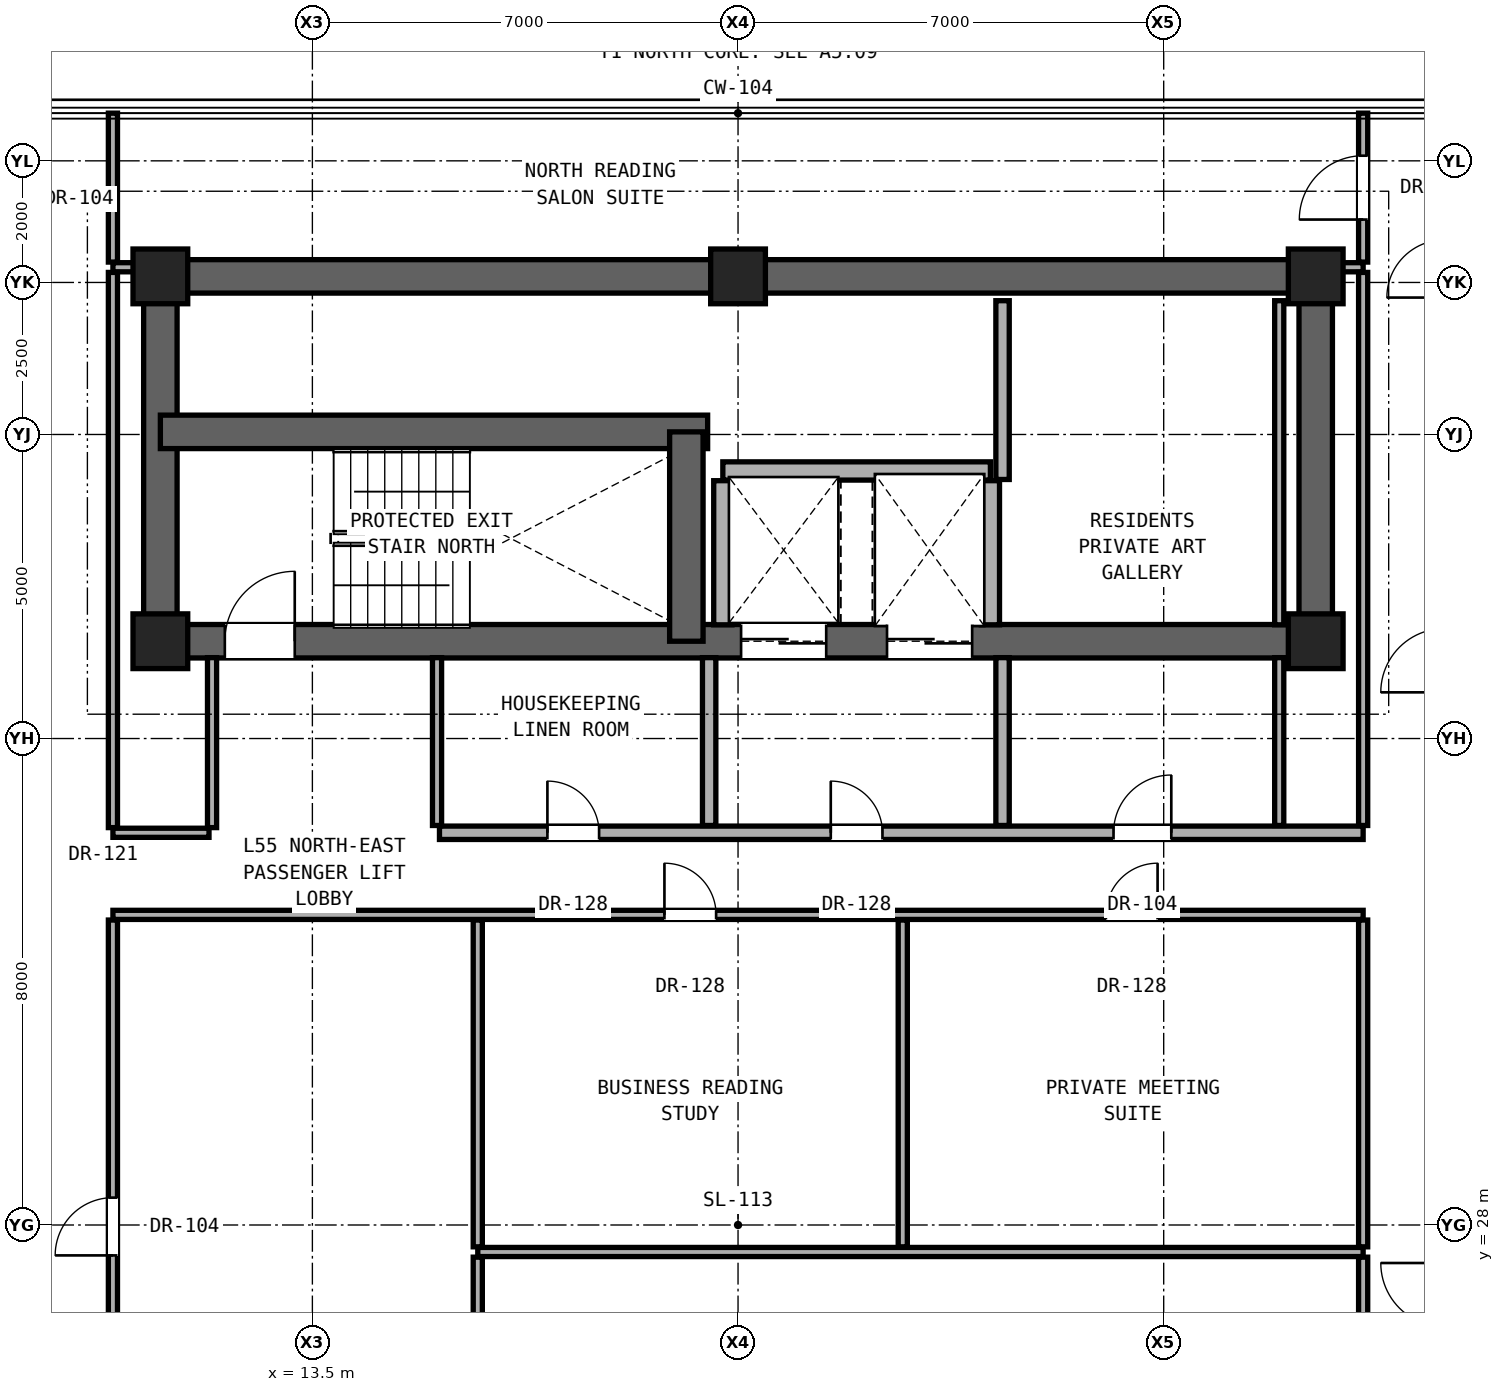
"""IFC4 building model, lengths in metres.
Left out: names, types, materials, properties, quantities, classifications, styles, units other than length and angle.
Written with IfcOpenShell. Run it as: python <this file> out.ifc"""

import sys

from ifc_helpers import new_model, si_unit, direction, frame, frame_2d, origin, origin_2d, place, context, subcontext, project, spatial, rectangle, extrude, element, fill, save


model = new_model("IFC4")
c1 = context("Model", 3, precision=1e-05, world=origin(), true_north=direction((0.0, 1.0)))
c2 = subcontext(c1, "Body", "Model", "MODEL_VIEW")
j1 = project(units=[si_unit("LENGTHUNIT", "METRE"), si_unit("PLANEANGLEUNIT", "RADIAN")], contexts=[c1])
p1 = place(None, origin())
s1 = spatial("IfcSite", under=j1, at=p1, CompositionType="ELEMENT")
p2 = place(p1, origin())
s2 = spatial("IfcBuilding", under=s1, at=p2, CompositionType="ELEMENT")
p3 = place(p2, frame((0.0, 0.0, 193.4)))
s3 = spatial("IfcBuildingStorey", under=s2, at=p3, CompositionType="ELEMENT", Elevation=193.4)
for number, where, z_axis, x_axis in (
    (1, (11.0, 37.6, 0.0), (0.0, 0.0, 1.0), (1.0, 0.0, 0.0)),
    (2, (30.0, 37.6, 0.0), (0.0, 0.0, 1.0), (1.0, 0.0, 0.0)),
    (3, (11.0, 43.6, 0.0), (0.0, 0.0, 1.0), (1.0, 0.0, 0.0)),
    (4, (20.5, 43.6, 0.0), (0.0, 0.0, 1.0), (1.0, 0.0, 0.0)),
    (5, (30.0, 43.6, 0.0), (0.0, 0.0, 1.0), (1.0, 0.0, 0.0)),
):
    element("IfcColumn", number, at=place(p3, frame(where, z_axis=z_axis, x_axis=x_axis)), inside=s3, PredefinedType="COLUMN", context=c2, shape_type="SweptSolid", body=[
        extrude(rectangle(XDim=0.9, YDim=0.9, at=origin_2d()), origin(), (0.0, 0.0, 1.0), 3.25),
    ])
p4 = place(p3, frame((11.0, 43.6, 0.0), z_axis=(0.0, 0.0, 1.0), x_axis=(1.0, 0.0, 0.0)))
e6 = element("IfcWall", 6, at=p4, inside=s3, PredefinedType="SHEAR", context=c2, shape_type="SweptSolid", body=[
    extrude(rectangle(XDim=19.0, YDim=0.55, at=frame_2d((9.5, 0.0))), origin(), (0.0, 0.0, 1.0), 3.05),
])
for number, where, z_axis, x_axis in (
    (7, (11.0, 37.6, 0.0), (0.0, 0.0, 1.0), (0.0, 1.0, 0.0)),
    (8, (30.0, 37.6, 0.0), (0.0, 0.0, 1.0), (0.0, 1.0, 0.0)),
):
    element("IfcWall", number, at=place(p3, frame(where, z_axis=z_axis, x_axis=x_axis)), inside=s3, PredefinedType="SHEAR", context=c2, shape_type="SweptSolid", body=[
        extrude(rectangle(XDim=6.0, YDim=0.55, at=frame_2d((3.0, 0.0))), origin(), (0.0, 0.0, 1.0), 3.05),
    ])
p5 = place(p3, frame((11.0, 37.6, 0.0), z_axis=(0.0, 0.0, 1.0), x_axis=(1.0, 0.0, 0.0)))
e9 = element("IfcWall", 9, at=p5, inside=s3, PredefinedType="SHEAR", context=c2, shape_type="SweptSolid", body=[
    extrude(rectangle(XDim=19.0, YDim=0.55, at=frame_2d((9.5, 0.0))), origin(), (0.0, 0.0, 1.0), 3.05),
])
p6 = place(p5, frame((1.06, 0.0, 0.0)))
e10 = element("IfcOpeningElement", 10, at=p6, cuts=e9, PredefinedType="OPENING", context=c2, shape_type="SweptSolid", body=[
    extrude(rectangle(XDim=1.15, YDim=2.2, at=frame_2d((0.575, 1.1))), frame((0.0, 0.285, 0.0), z_axis=(0.0, -1.0, 0.0), x_axis=(1.0, 0.0, 0.0)), (0.0, 0.0, 1.0), 0.57),
])
p7 = place(p5, frame((9.55, 0.0, 0.0)))
e11 = element("IfcOpeningElement", 11, at=p7, cuts=e9, PredefinedType="OPENING", context=c2, shape_type="SweptSolid", body=[
    extrude(rectangle(XDim=1.4, YDim=2.35, at=frame_2d((0.7, 1.175))), frame((0.0, 0.285, 0.0), z_axis=(0.0, -1.0, 0.0), x_axis=(1.0, 0.0, 0.0)), (0.0, 0.0, 1.0), 0.57),
])
p8 = place(p5, frame((11.95, 0.0, 0.0)))
e12 = element("IfcOpeningElement", 12, at=p8, cuts=e9, PredefinedType="OPENING", context=c2, shape_type="SweptSolid", body=[
    extrude(rectangle(XDim=1.4, YDim=2.35, at=frame_2d((0.7, 1.175))), frame((0.0, 0.285, 0.0), z_axis=(0.0, -1.0, 0.0), x_axis=(1.0, 0.0, 0.0)), (0.0, 0.0, 1.0), 0.57),
])
p9 = place(p3, frame((11.0, 41.043, 0.0), z_axis=(0.0, 0.0, 1.0), x_axis=(1.0, 0.0, 0.0)))
e13 = element("IfcWall", 13, at=p9, inside=s3, PredefinedType="SHEAR", context=c2, shape_type="SweptSolid", body=[
    extrude(rectangle(XDim=9.0, YDim=0.55, at=frame_2d((4.5, 0.0))), origin(), (0.0, 0.0, 1.0), 3.05),
])
p10 = place(p3, frame((19.65, 37.6, 0.0), z_axis=(0.0, 0.0, 1.0), x_axis=(0.0, 1.0, 0.0)))
e14 = element("IfcWall", 14, at=p10, inside=s3, PredefinedType="SHEAR", context=c2, shape_type="SweptSolid", body=[
    extrude(rectangle(XDim=3.443, YDim=0.55, at=frame_2d((1.721, 0.0))), origin(), (0.0, 0.0, 1.0), 3.05),
])
p11 = place(p3, frame((16.22, 27.556, 0.0), z_axis=(0.0, 0.0, 1.0), x_axis=(1.0, 0.0, 0.0)))
e15 = element("IfcWall", 15, at=p11, inside=s3, PredefinedType="PARTITIONING", context=c2, shape_type="SweptSolid", body=[
    extrude(rectangle(XDim=14.56, YDim=0.15, at=frame_2d((7.28, 0.0))), origin(), (0.0, 0.0, 1.0), 2.186),
])
p12 = place(p3, frame((10.22, 33.1, 0.0), z_axis=(0.0, 0.0, 1.0), x_axis=(1.0, 0.0, 0.0)))
e16 = element("IfcWall", 16, at=p12, inside=s3, PredefinedType="PARTITIONING", context=c2, shape_type="SweptSolid", body=[
    extrude(rectangle(XDim=20.56, YDim=0.15, at=frame_2d((10.28, 0.0))), origin(), (0.0, 0.0, 1.0), 2.186),
])
p13 = place(p12, frame((9.07, 0.0, 0.0)))
e17 = element("IfcOpeningElement", 17, at=p13, cuts=e16, PredefinedType="OPENING", context=c2, shape_type="SweptSolid", body=[
    extrude(rectangle(XDim=0.85, YDim=2.01, at=frame_2d((0.425, 1.005))), frame((0.0, 0.085, 0.0), z_axis=(0.0, -1.0, 0.0), x_axis=(1.0, 0.0, 0.0)), (0.0, 0.0, 1.0), 0.17),
])
p14 = place(p12, frame((16.33, 0.0, 0.0)))
e18 = element("IfcOpeningElement", 18, at=p14, cuts=e16, PredefinedType="OPENING", context=c2, shape_type="SweptSolid", body=[
    extrude(rectangle(XDim=0.85, YDim=2.01, at=frame_2d((0.425, 1.005))), frame((0.0, 0.085, 0.0), z_axis=(0.0, -1.0, 0.0), x_axis=(1.0, 0.0, 0.0)), (0.0, 0.0, 1.0), 0.17),
])
p15 = place(p3, frame((10.22, 34.45, 0.0), z_axis=(0.0, 0.0, 1.0), x_axis=(1.0, 0.0, 0.0)))
e19 = element("IfcWall", 19, at=p15, inside=s3, PredefinedType="PARTITIONING", context=c2, shape_type="SweptSolid", body=[
    extrude(rectangle(XDim=1.58, YDim=0.15, at=frame_2d((0.79, 0.0))), origin(), (0.0, 0.0, 1.0), 2.186),
])
p16 = place(p3, frame((15.59, 34.45, 0.0), z_axis=(0.0, 0.0, 1.0), x_axis=(1.0, 0.0, 0.0)))
e20 = element("IfcWall", 20, at=p16, inside=s3, PredefinedType="SOLIDWALL", context=c2, shape_type="SweptSolid", body=[
    extrude(rectangle(XDim=15.19, YDim=0.22, at=frame_2d((7.595, 0.0))), origin(), (0.0, 0.0, 1.0), 2.186),
])
p17 = place(p16, frame((6.435, 0.0, 0.0)))
e21 = element("IfcOpeningElement", 21, at=p17, cuts=e20, PredefinedType="OPENING", context=c2, shape_type="SweptSolid", body=[
    extrude(rectangle(XDim=0.85, YDim=2.01, at=frame_2d((0.425, 1.005))), frame((0.0, 0.12, 0.0), z_axis=(0.0, -1.0, 0.0), x_axis=(1.0, 0.0, 0.0)), (0.0, 0.0, 1.0), 0.24),
])
p18 = place(p16, frame((11.085, 0.0, 0.0)))
e22 = element("IfcOpeningElement", 22, at=p18, cuts=e20, PredefinedType="OPENING", context=c2, shape_type="SweptSolid", body=[
    extrude(rectangle(XDim=0.95, YDim=2.15, at=frame_2d((0.475, 1.075))), frame((0.0, 0.12, 0.0), z_axis=(0.0, -1.0, 0.0), x_axis=(1.0, 0.0, 0.0)), (0.0, 0.0, 1.0), 0.24),
])
p19 = place(p16, frame((1.775, 0.0, 0.0)))
e23 = element("IfcOpeningElement", 23, at=p19, cuts=e20, PredefinedType="OPENING", context=c2, shape_type="SweptSolid", body=[
    extrude(rectangle(XDim=0.85, YDim=2.01, at=frame_2d((0.425, 1.005))), frame((0.0, 0.12, 0.0), z_axis=(0.0, -1.0, 0.0), x_axis=(1.0, 0.0, 0.0)), (0.0, 0.0, 1.0), 0.24),
])
p20 = place(p3, frame((20.25, 40.4, 0.0), z_axis=(0.0, 0.0, 1.0), x_axis=(1.0, 0.0, 0.0)))
e24 = element("IfcWall", 24, at=p20, inside=s3, PredefinedType="SOLIDWALL", context=c2, shape_type="SweptSolid", body=[
    extrude(rectangle(XDim=4.4, YDim=0.3, at=frame_2d((2.2, 0.0))), origin(), (0.0, 0.0, 1.0), 3.05),
])
for number, where, z_axis, x_axis in (
    (25, (10.22, 43.75, 0.0), (0.0, 0.0, 1.0), (1.0, 0.0, 0.0)),
    (26, (30.27, 43.75, 0.0), (0.0, 0.0, 1.0), (1.0, 0.0, 0.0)),
):
    element("IfcWall", number, at=place(p3, frame(where, z_axis=z_axis, x_axis=x_axis)), inside=s3, PredefinedType="PARTITIONING", context=c2, shape_type="SweptSolid", body=[
        extrude(rectangle(XDim=0.51, YDim=0.15, at=frame_2d((0.255, 0.0))), origin(), (0.0, 0.0, 1.0), 3.05),
    ])
p21 = place(p3, frame((10.22, 22.935, 0.0), z_axis=(0.0, 0.0, 1.0), x_axis=(0.0, 1.0, 0.0)))
e27 = element("IfcWall", 27, at=p21, inside=s3, PredefinedType="PARTITIONING", context=c2, shape_type="SweptSolid", body=[
    extrude(rectangle(XDim=10.08, YDim=0.15, at=frame_2d((5.04, 0.0))), origin(), (0.0, 0.0, 1.0), 2.346),
])
p22 = place(p21, frame((4.565, 0.0, 0.0)))
e28 = element("IfcOpeningElement", 28, at=p22, cuts=e27, PredefinedType="OPENING", context=c2, shape_type="SweptSolid", body=[
    extrude(rectangle(XDim=0.95, YDim=2.15, at=frame_2d((0.475, 1.075))), frame((0.0, 0.085, 0.0), z_axis=(0.0, -1.0, 0.0), x_axis=(1.0, 0.0, 0.0)), (0.0, 0.0, 1.0), 0.17),
])
p23 = place(p3, frame((10.22, 34.535, 0.0), z_axis=(0.0, 0.0, 1.0), x_axis=(0.0, 1.0, 0.0)))
e29 = element("IfcWall", 29, at=p23, inside=s3, PredefinedType="PARTITIONING", context=c2, shape_type="SweptSolid", body=[
    extrude(rectangle(XDim=9.13, YDim=0.15, at=frame_2d((4.565, 0.0))), origin(), (0.0, 0.0, 1.0), 2.442),
])
p24 = place(p3, frame((10.22, 43.835, 0.0), z_axis=(0.0, 0.0, 1.0), x_axis=(0.0, 1.0, 0.0)))
e30 = element("IfcWall", 30, at=p24, inside=s3, PredefinedType="PARTITIONING", context=c2, shape_type="SweptSolid", body=[
    extrude(rectangle(XDim=2.449, YDim=0.15, at=frame_2d((1.225, 0.0))), origin(), (0.0, 0.0, 1.0), 3.05),
])
p25 = place(p3, frame((11.85, 34.535, 0.0), z_axis=(0.0, 0.0, 1.0), x_axis=(0.0, 1.0, 0.0)))
e31 = element("IfcWall", 31, at=p25, inside=s3, PredefinedType="PARTITIONING", context=c2, shape_type="SweptSolid", body=[
    extrude(rectangle(XDim=2.795, YDim=0.15, at=frame_2d((1.397, 0.0))), origin(), (0.0, 0.0, 1.0), 3.05),
])
p26 = place(p3, frame((15.55, 34.57, 0.0), z_axis=(0.0, 0.0, 1.0), x_axis=(0.0, 1.0, 0.0)))
e32 = element("IfcWall", 32, at=p26, inside=s3, PredefinedType="PARTITIONING", context=c2, shape_type="SweptSolid", body=[
    extrude(rectangle(XDim=2.76, YDim=0.15, at=frame_2d((1.38, 0.0))), origin(), (0.0, 0.0, 1.0), 3.05),
])
p27 = place(p3, frame((16.22, 22.935, 0.0), z_axis=(0.0, 0.0, 1.0), x_axis=(0.0, 1.0, 0.0)))
e33 = element("IfcWall", 33, at=p27, inside=s3, PredefinedType="PARTITIONING", context=c2, shape_type="SweptSolid", body=[
    extrude(rectangle(XDim=4.536, YDim=0.15, at=frame_2d((2.268, 0.0))), origin(), (0.0, 0.0, 1.0), 2.186),
])
p28 = place(p3, frame((16.22, 27.641, 0.0), z_axis=(0.0, 0.0, 1.0), x_axis=(0.0, 1.0, 0.0)))
e34 = element("IfcWall", 34, at=p28, inside=s3, PredefinedType="PARTITIONING", context=c2, shape_type="SweptSolid", body=[
    extrude(rectangle(XDim=5.374, YDim=0.15, at=frame_2d((2.687, 0.0))), origin(), (0.0, 0.0, 1.0), 2.186),
])
p29 = place(p3, frame((20.025, 34.57, 0.0), z_axis=(0.0, 0.0, 1.0), x_axis=(0.0, 1.0, 0.0)))
e35 = element("IfcWall", 35, at=p29, inside=s3, PredefinedType="SOLIDWALL", context=c2, shape_type="SweptSolid", body=[
    extrude(rectangle(XDim=2.76, YDim=0.22, at=frame_2d((1.38, 0.0))), origin(), (0.0, 0.0, 1.0), 3.05),
])
p30 = place(p3, frame((20.25, 37.87, 0.0), z_axis=(0.0, 0.0, 1.0), x_axis=(0.0, 1.0, 0.0)))
e36 = element("IfcWall", 36, at=p30, inside=s3, PredefinedType="SOLIDWALL", context=c2, shape_type="SweptSolid", body=[
    extrude(rectangle(XDim=2.37, YDim=0.3, at=frame_2d((1.185, 0.0))), origin(), (0.0, 0.0, 1.0), 3.05),
])
p31 = place(p3, frame((23.209, 27.641, 0.0), z_axis=(0.0, 0.0, 1.0), x_axis=(0.0, 1.0, 0.0)))
e37 = element("IfcWall", 37, at=p31, inside=s3, PredefinedType="PARTITIONING", context=c2, shape_type="SweptSolid", body=[
    extrude(rectangle(XDim=5.374, YDim=0.15, at=frame_2d((2.687, 0.0))), origin(), (0.0, 0.0, 1.0), 2.186),
])
p32 = place(p3, frame((24.65, 37.87, 0.0), z_axis=(0.0, 0.0, 1.0), x_axis=(0.0, 1.0, 0.0)))
e38 = element("IfcWall", 38, at=p32, inside=s3, PredefinedType="SOLIDWALL", context=c2, shape_type="SweptSolid", body=[
    extrude(rectangle(XDim=2.37, YDim=0.3, at=frame_2d((1.185, 0.0))), origin(), (0.0, 0.0, 1.0), 3.05),
])
p33 = place(p3, frame((24.85, 34.57, 0.0), z_axis=(0.0, 0.0, 1.0), x_axis=(0.0, 1.0, 0.0)))
e39 = element("IfcWall", 39, at=p33, inside=s3, PredefinedType="SOLIDWALL", context=c2, shape_type="SweptSolid", body=[
    extrude(rectangle(XDim=2.76, YDim=0.22, at=frame_2d((1.38, 0.0))), origin(), (0.0, 0.0, 1.0), 3.05),
])
p34 = place(p3, frame((24.85, 40.26, 0.0), z_axis=(0.0, 0.0, 1.0), x_axis=(0.0, 1.0, 0.0)))
e40 = element("IfcWall", 40, at=p34, inside=s3, PredefinedType="SOLIDWALL", context=c2, shape_type="SweptSolid", body=[
    extrude(rectangle(XDim=2.94, YDim=0.22, at=frame_2d((1.47, 0.0))), origin(), (0.0, 0.0, 1.0), 3.05),
])
p35 = place(p3, frame((29.4, 34.57, 0.0), z_axis=(0.0, 0.0, 1.0), x_axis=(0.0, 1.0, 0.0)))
e41 = element("IfcWall", 41, at=p35, inside=s3, PredefinedType="PARTITIONING", context=c2, shape_type="SweptSolid", body=[
    extrude(rectangle(XDim=2.76, YDim=0.15, at=frame_2d((1.38, 0.0))), origin(), (0.0, 0.0, 1.0), 3.05),
])
p36 = place(p3, frame((29.4, 37.87, 0.0), z_axis=(0.0, 0.0, 1.0), x_axis=(0.0, 1.0, 0.0)))
e42 = element("IfcWall", 42, at=p36, inside=s3, PredefinedType="PARTITIONING", context=c2, shape_type="SweptSolid", body=[
    extrude(rectangle(XDim=5.33, YDim=0.15, at=frame_2d((2.665, 0.0))), origin(), (0.0, 0.0, 1.0), 3.05),
])
p37 = place(p3, frame((30.78, 19.985, 0.0), z_axis=(0.0, 0.0, 1.0), x_axis=(0.0, 1.0, 0.0)))
e43 = element("IfcWall", 43, at=p37, inside=s3, PredefinedType="PARTITIONING", context=c2, shape_type="SweptSolid", body=[
    extrude(rectangle(XDim=7.486, YDim=0.15, at=frame_2d((3.743, 0.0))), origin(), (0.0, 0.0, 1.0), 2.346),
])
p38 = place(p3, frame((30.78, 27.641, 0.0), z_axis=(0.0, 0.0, 1.0), x_axis=(0.0, 1.0, 0.0)))
e44 = element("IfcWall", 44, at=p38, inside=s3, PredefinedType="PARTITIONING", context=c2, shape_type="SweptSolid", body=[
    extrude(rectangle(XDim=5.374, YDim=0.15, at=frame_2d((2.687, 0.0))), origin(), (0.0, 0.0, 1.0), 2.346),
])
p39 = place(p3, frame((30.78, 34.57, 0.0), z_axis=(0.0, 0.0, 1.0), x_axis=(0.0, 1.0, 0.0)))
e45 = element("IfcWall", 45, at=p39, inside=s3, PredefinedType="PARTITIONING", context=c2, shape_type="SweptSolid", body=[
    extrude(rectangle(XDim=9.095, YDim=0.15, at=frame_2d((4.547, 0.0))), origin(), (0.0, 0.0, 1.0), 2.442),
])
p40 = place(p3, frame((30.78, 43.835, 0.0), z_axis=(0.0, 0.0, 1.0), x_axis=(0.0, 1.0, 0.0)))
e46 = element("IfcWall", 46, at=p40, inside=s3, PredefinedType="PARTITIONING", context=c2, shape_type="SweptSolid", body=[
    extrude(rectangle(XDim=2.449, YDim=0.15, at=frame_2d((1.225, 0.0))), origin(), (0.0, 0.0, 1.0), 3.05),
])
p41 = place(p40, frame((0.699, 0.0, 0.0)))
e47 = element("IfcOpeningElement", 47, at=p41, cuts=e46, PredefinedType="OPENING", context=c2, shape_type="SweptSolid", body=[
    extrude(rectangle(XDim=1.05, YDim=2.2, at=frame_2d((0.525, 1.1))), frame((0.0, 0.085, 0.0), z_axis=(0.0, -1.0, 0.0), x_axis=(1.0, 0.0, 0.0)), (0.0, 0.0, 1.0), 0.17),
])
p42 = place(p6, origin())
e48 = element("IfcDoor", 48, at=p42, inside=s3, OperationType="SINGLE_SWING_RIGHT", PredefinedType="DOOR", context=c2, shape_type="SweptSolid", body=[
    extrude(rectangle(XDim=1.15, YDim=2.2, at=frame_2d((0.575, 1.1))), frame((0.0, 0.025, 0.0), z_axis=(0.0, -1.0, 0.0), x_axis=(1.0, 0.0, 0.0)), (0.0, 0.0, 1.0), 0.05),
])
fill(e10, e48)
p43 = place(p17, origin())
e49 = element("IfcDoor", 49, at=p43, inside=s3, OperationType="SINGLE_SWING_LEFT", PredefinedType="DOOR", context=c2, shape_type="SweptSolid", body=[
    extrude(rectangle(XDim=0.85, YDim=2.01, at=frame_2d((0.425, 1.005))), frame((0.0, 0.025, 0.0), z_axis=(0.0, -1.0, 0.0), x_axis=(1.0, 0.0, 0.0)), (0.0, 0.0, 1.0), 0.05),
])
fill(e21, e49)
p44 = place(p18, origin())
e50 = element("IfcDoor", 50, at=p44, inside=s3, OperationType="SINGLE_SWING_RIGHT", PredefinedType="DOOR", context=c2, shape_type="SweptSolid", body=[
    extrude(rectangle(XDim=0.95, YDim=2.15, at=frame_2d((0.475, 1.075))), frame((0.0, 0.025, 0.0), z_axis=(0.0, -1.0, 0.0), x_axis=(1.0, 0.0, 0.0)), (0.0, 0.0, 1.0), 0.05),
])
fill(e22, e50)
p45 = place(p19, origin())
e51 = element("IfcDoor", 51, at=p45, inside=s3, OperationType="SINGLE_SWING_LEFT", PredefinedType="DOOR", context=c2, shape_type="SweptSolid", body=[
    extrude(rectangle(XDim=0.85, YDim=2.01, at=frame_2d((0.425, 1.005))), frame((0.0, 0.025, 0.0), z_axis=(0.0, -1.0, 0.0), x_axis=(1.0, 0.0, 0.0)), (0.0, 0.0, 1.0), 0.05),
])
fill(e23, e51)
p46 = place(p22, origin())
e52 = element("IfcDoor", 52, at=p46, inside=s3, OperationType="SINGLE_SWING_LEFT", PredefinedType="DOOR", context=c2, shape_type="SweptSolid", body=[
    extrude(rectangle(XDim=0.95, YDim=2.15, at=frame_2d((0.475, 1.075))), frame((0.0, 0.025, 0.0), z_axis=(0.0, -1.0, 0.0), x_axis=(1.0, 0.0, 0.0)), (0.0, 0.0, 1.0), 0.05),
])
fill(e28, e52)
p47 = place(p13, origin())
e53 = element("IfcDoor", 53, at=p47, inside=s3, OperationType="SINGLE_SWING_LEFT", PredefinedType="DOOR", context=c2, shape_type="SweptSolid", body=[
    extrude(rectangle(XDim=0.85, YDim=2.01, at=frame_2d((0.425, 1.005))), frame((0.0, 0.025, 0.0), z_axis=(0.0, -1.0, 0.0), x_axis=(1.0, 0.0, 0.0)), (0.0, 0.0, 1.0), 0.05),
])
fill(e17, e53)
p48 = place(p14, origin())
e54 = element("IfcDoor", 54, at=p48, inside=s3, OperationType="SINGLE_SWING_RIGHT", PredefinedType="DOOR", context=c2, shape_type="SweptSolid", body=[
    extrude(rectangle(XDim=0.85, YDim=2.01, at=frame_2d((0.425, 1.005))), frame((0.0, 0.025, 0.0), z_axis=(0.0, -1.0, 0.0), x_axis=(1.0, 0.0, 0.0)), (0.0, 0.0, 1.0), 0.05),
])
fill(e18, e54)
p49 = place(p41, origin())
e55 = element("IfcDoor", 55, at=p49, inside=s3, OperationType="SINGLE_SWING_LEFT", PredefinedType="DOOR", context=c2, shape_type="SweptSolid", body=[
    extrude(rectangle(XDim=1.05, YDim=2.2, at=frame_2d((0.525, 1.1))), frame((0.0, 0.025, 0.0), z_axis=(0.0, -1.0, 0.0), x_axis=(1.0, 0.0, 0.0)), (0.0, 0.0, 1.0), 0.05),
])
fill(e47, e55)
p50 = place(p7, origin())
e56 = element("IfcDoor", 56, at=p50, inside=s3, OperationType="DOUBLE_DOOR_SLIDING", PredefinedType="DOOR", context=c2, shape_type="SweptSolid", body=[
    extrude(rectangle(XDim=1.4, YDim=2.35, at=frame_2d((0.7, 1.175))), frame((0.0, 0.025, 0.0), z_axis=(0.0, -1.0, 0.0), x_axis=(1.0, 0.0, 0.0)), (0.0, 0.0, 1.0), 0.05),
])
fill(e11, e56)
p51 = place(p8, origin())
e57 = element("IfcDoor", 57, at=p51, inside=s3, OperationType="DOUBLE_DOOR_SLIDING", PredefinedType="DOOR", context=c2, shape_type="SweptSolid", body=[
    extrude(rectangle(XDim=1.4, YDim=2.35, at=frame_2d((0.7, 1.175))), frame((0.0, 0.025, 0.0), z_axis=(0.0, -1.0, 0.0), x_axis=(1.0, 0.0, 0.0)), (0.0, 0.0, 1.0), 0.05),
])
fill(e12, e57)
save(model, sys.argv[1])
